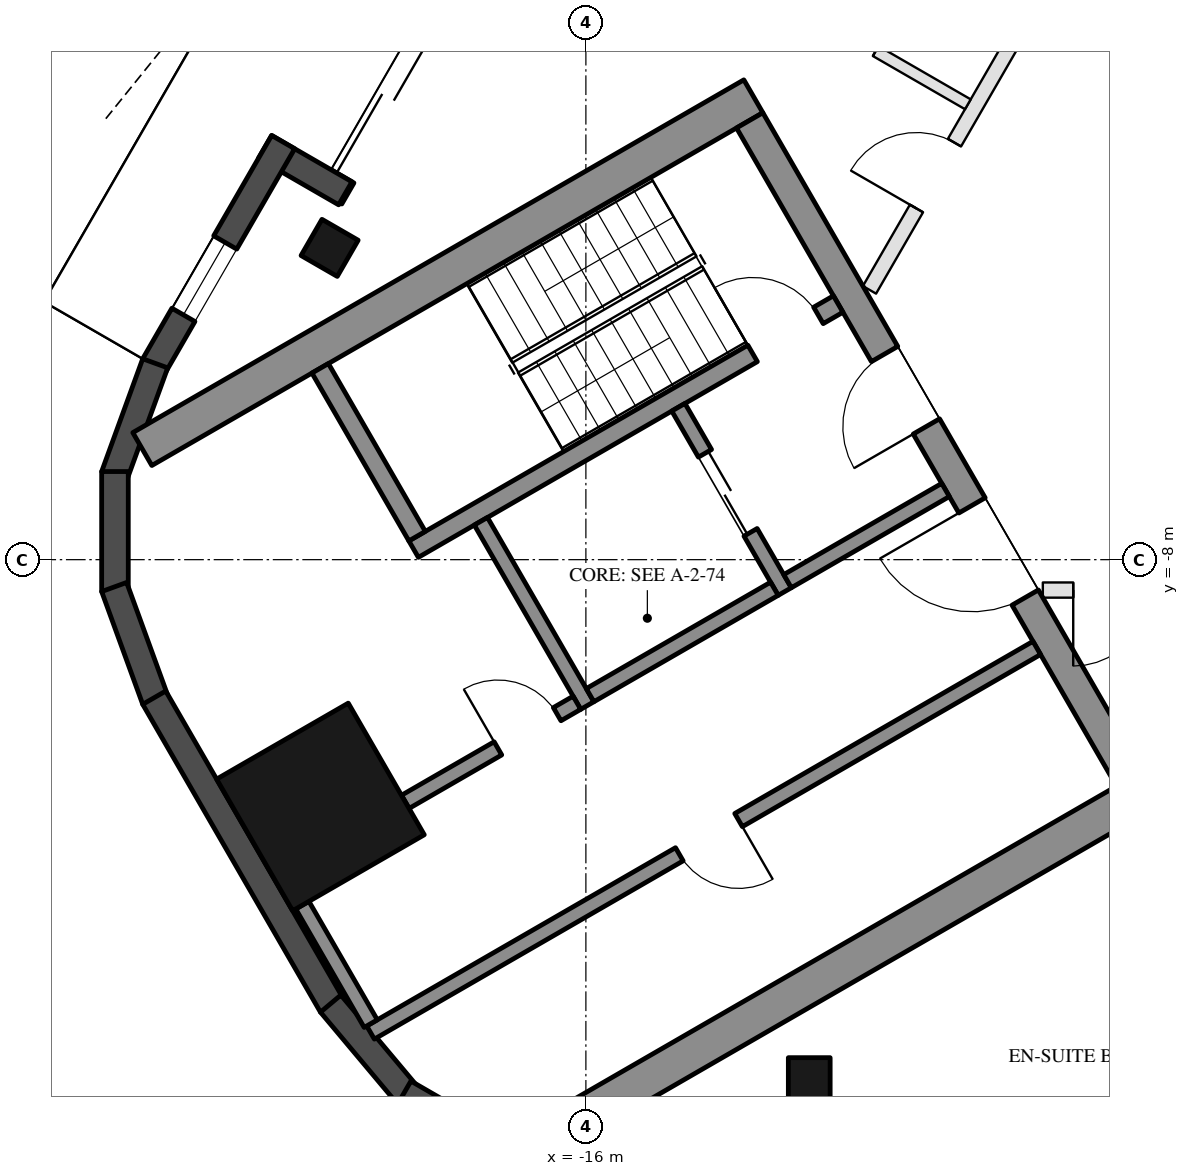
"""IFC4 building model, lengths in metres.
Left out: names, types, materials, properties, quantities, classifications, styles, units other than length and angle.
Written with IfcOpenShell. Run it as: python <this file> out.ifc"""

import sys

from ifc_helpers import new_model, si_unit, direction, frame, frame_2d, origin, origin_2d, place, context, subcontext, project, spatial, rectangle, hollow_rectangle, extrude, boolean, halfspace, element, fill, save


model = new_model("IFC4")
c1 = context("Model", 3, precision=1e-05, world=origin(), true_north=direction((0.0, 1.0)))
c2 = subcontext(c1, "Body", "Model", "MODEL_VIEW")
j1 = project(units=[si_unit("LENGTHUNIT", "METRE"), si_unit("PLANEANGLEUNIT", "RADIAN")], contexts=[c1])
p1 = place(None, origin())
s1 = spatial("IfcSite", under=j1, at=p1, CompositionType="ELEMENT")
p2 = place(p1, origin())
s2 = spatial("IfcBuilding", under=s1, at=p2, CompositionType="ELEMENT")
p3 = place(p2, frame((0.0, 0.0, 317.0)))
s3 = spatial("IfcBuildingStorey", under=s2, at=p3, CompositionType="ELEMENT", Elevation=317.0)
for number, where, z_axis, x_axis in (
    (1, (-13.061, -14.827, 0.0), (0.0, 0.0, 1.0), (-1.0, 0.0, 0.0)),
    (2, (-19.372, -3.898, 0.0), (0.0, 0.0, 1.0), (0.5, 0.866, 0.0)),
):
    element("IfcColumn", number, at=place(p3, frame(where, z_axis=z_axis, x_axis=x_axis)), inside=s3, PredefinedType="COLUMN", context=c2, shape_type="SweptSolid", body=[
        boolean("DIFFERENCE", extrude(hollow_rectangle(XDim=0.55, YDim=0.55, WallThickness=0.025, at=origin_2d()), origin(), (0.0, 0.0, 1.0), 3.7), halfspace(frame((0.0, 0.0, 3.66), z_axis=(0.0, 0.0, 1.0), x_axis=(1.0, 0.0, 0.0)), False)),
    ])
p4 = place(p3, frame((-19.492, -11.254, 0.0), z_axis=(0.0, 0.0, 1.0), x_axis=(-0.5, 0.866025403784, 0.0)))
e3 = element("IfcColumn", 3, at=p4, inside=s3, PredefinedType="COLUMN", context=c2, shape_type="SweptSolid", body=[
    boolean("DIFFERENCE", extrude(hollow_rectangle(XDim=2.0, YDim=2.0, WallThickness=0.05, at=origin_2d()), origin(), (0.0, 0.0, 1.0), 3.7), halfspace(frame((0.0, 0.0, 3.587), z_axis=(0.0, 0.0, 1.0), x_axis=(1.0, 0.0, 0.0)), False)),
])
p5 = place(p3, frame((-16.678, 1.418, 0.0), z_axis=(0.0, 0.0, 1.0), x_axis=(-0.499996591357, -0.866027371756, 0.0)))
e4 = element("IfcWall", 4, at=p5, inside=s3, PredefinedType="SOLIDWALL", context=c2, shape_type="SweptSolid", body=[
    extrude(rectangle(XDim=5.371, YDim=0.35, at=frame_2d((2.685, 0.0))), origin(), (0.0, 0.0, 1.0), 3.55),
])
p6 = place(p5, frame((2.651, 0.0, 0.0)))
e5 = element("IfcOpeningElement", 5, at=p6, cuts=e4, PredefinedType="OPENING", context=c2, shape_type="SweptSolid", body=[
    extrude(rectangle(XDim=2.4, YDim=2.4, at=frame_2d((1.2, 1.2))), frame((0.0, 0.185, 0.0), z_axis=(0.0, -1.0, 0.0), x_axis=(1.0, 0.0, 0.0)), (0.0, 0.0, 1.0), 0.37),
])
p7 = place(p5, frame((0.77, 0.0, 0.3)))
e6 = element("IfcOpeningElement", 6, at=p7, cuts=e4, PredefinedType="OPENING", context=c2, shape_type="SweptSolid", body=[
    extrude(rectangle(XDim=1.5, YDim=2.65, at=frame_2d((0.75, 1.325))), frame((0.0, 0.185, 0.0), z_axis=(0.0, -1.0, 0.0), x_axis=(1.0, 0.0, 0.0)), (0.0, 0.0, 1.0), 0.37),
])
p8 = place(p3, frame((-19.165, -3.18, 0.0), z_axis=(0.0, 0.0, 1.0), x_axis=(-0.866005645448, 0.500034220881, 0.0)))
e7 = element("IfcWall", 7, at=p8, inside=s3, PredefinedType="SOLIDWALL", context=c2, shape_type="SweptSolid", body=[
    extrude(rectangle(XDim=1.22, YDim=0.35, at=frame_2d((0.61, 0.0))), origin(), (0.0, 0.0, 1.0), 3.55),
])
p9 = place(p3, frame((-19.982, -2.506, 0.0), z_axis=(0.0, 0.0, 1.0), x_axis=(-0.500054617923, -0.865993867816, 0.0)))
e8 = element("IfcWall", 8, at=p9, inside=s3, PredefinedType="SOLIDWALL", context=c2, shape_type="SweptSolid", body=[
    extrude(rectangle(XDim=3.393, YDim=0.35, at=frame_2d((1.697, 0.0))), origin(), (0.0, 0.0, 1.0), 3.55),
])
p10 = place(p9, frame((1.525, 0.0, 0.3)))
e9 = element("IfcOpeningElement", 9, at=p10, cuts=e8, PredefinedType="OPENING", context=c2, shape_type="SweptSolid", body=[
    extrude(rectangle(XDim=1.1, YDim=2.65, at=frame_2d((0.55, 1.325))), frame((0.0, 0.185, 0.0), z_axis=(0.0, -1.0, 0.0), x_axis=(1.0, 0.0, 0.0)), (0.0, 0.0, 1.0), 0.37),
])
for number, where, z_axis, x_axis in (
    (10, (-21.666, -5.417, 0.0), (0.0, 0.0, 1.0), (-0.342, -0.94, 0.0)),
    (11, (-22.196, -6.841, 0.0), (0.0, 0.0, 1.0), (0.0, -1.0, 0.0)),
    (12, (-22.206, -8.36, 0.0), (0.0, 0.0, 1.0), (0.342, -0.94, 0.0)),
):
    element("IfcWall", number, at=place(p3, frame(where, z_axis=z_axis, x_axis=x_axis)), inside=s3, PredefinedType="SOLIDWALL", context=c2, shape_type="SweptSolid", body=[
        extrude(rectangle(XDim=1.579, YDim=0.35, at=frame_2d((0.79, 0.0))), origin(), (0.0, 0.0, 1.0), 3.55),
    ])
p11 = place(p3, frame((-21.679, -9.816, 0.0), z_axis=(0.0, 0.0, 1.0), x_axis=(0.500023656998, -0.86601174498, 0.0)))
e13 = element("IfcWall", 13, at=p11, inside=s3, PredefinedType="SOLIDWALL", context=c2, shape_type="SweptSolid", body=[
    extrude(rectangle(XDim=4.677, YDim=0.35, at=frame_2d((2.339, 0.0))), origin(), (0.0, 0.0, 1.0), 3.55),
])
for number, where, z_axis, x_axis in (
    (14, (-19.358, -13.842, 0.0), (0.0, 0.0, 1.0), (0.643, -0.766, 0.0)),
    (15, (-18.389, -15.012, 0.0), (0.0, 0.0, 1.0), (0.866, -0.5, 0.0)),
):
    element("IfcWall", number, at=place(p3, frame(where, z_axis=z_axis, x_axis=x_axis)), inside=s3, PredefinedType="SOLIDWALL", context=c2, shape_type="SweptSolid", body=[
        extrude(rectangle(XDim=1.579, YDim=0.35, at=frame_2d((0.79, 0.0))), origin(), (0.0, 0.0, 1.0), 3.55),
    ])
for number, where, z_axis, x_axis in (
    (16, (-13.797, -1.903, 0.0), (0.0, 0.0, 1.0), (-0.866, -0.5, 0.0)),
    (17, (-8.547, -10.997, 0.0), (0.0, 0.0, 1.0), (-0.866, -0.5, 0.0)),
):
    element("IfcWall", number, at=place(p3, frame(where, z_axis=z_axis, x_axis=x_axis)), inside=s3, PredefinedType="SHEAR", context=c2, shape_type="SweptSolid", body=[
        extrude(rectangle(XDim=9.283, YDim=0.5, at=frame_2d((4.641, 0.0))), origin(), (0.0, 0.0, 1.0), 3.5),
    ])
p12 = place(p3, frame((-13.845, -2.22, 0.0), z_axis=(0.0, 0.0, 1.0), x_axis=(0.500004234368, -0.866022959057, 0.0)))
e18 = element("IfcWall", 18, at=p12, inside=s3, PredefinedType="SHEAR", context=c2, shape_type="SweptSolid", body=[
    extrude(rectangle(XDim=10.0, YDim=0.4, at=frame_2d((5.0, 0.0))), origin(), (0.0, 0.0, 1.0), 3.5),
])
p13 = place(p12, frame((3.55, 0.0, 0.0)))
e19 = element("IfcOpeningElement", 19, at=p13, cuts=e18, PredefinedType="OPENING", context=c2, shape_type="SweptSolid", body=[
    extrude(rectangle(XDim=1.1, YDim=2.1, at=frame_2d((0.55, 1.05))), frame((0.0, 0.21, 0.0), z_axis=(0.0, -1.0, 0.0), x_axis=(1.0, 0.0, 0.0)), (0.0, 0.0, 1.0), 0.42),
])
p14 = place(p12, frame((5.85, 0.0, 0.0)))
e20 = element("IfcOpeningElement", 20, at=p14, cuts=e18, PredefinedType="OPENING", context=c2, shape_type="SweptSolid", body=[
    extrude(rectangle(XDim=1.4, YDim=2.1, at=frame_2d((0.7, 1.05))), frame((0.0, 0.21, 0.0), z_axis=(0.0, -1.0, 0.0), x_axis=(1.0, 0.0, 0.0)), (0.0, 0.0, 1.0), 0.42),
])
p15 = place(p3, frame((-12.681, -4.636, 0.0), z_axis=(0.0, 0.0, 1.0), x_axis=(-0.866021702275, -0.500006411147, 0.0)))
e21 = element("IfcWall", 21, at=p15, inside=s3, PredefinedType="SHEAR", context=c2, shape_type="SweptSolid", body=[
    extrude(rectangle(XDim=6.45, YDim=0.25, at=frame_2d((3.225, 0.0))), origin(), (0.0, 0.0, 1.0), 3.5),
])
p16 = place(p15, frame((0.3, 0.0, 0.0)))
e22 = element("IfcOpeningElement", 22, at=p16, cuts=e21, PredefinedType="OPENING", context=c2, shape_type="SweptSolid", body=[
    extrude(rectangle(XDim=1.0, YDim=2.1, at=frame_2d((0.5, 1.05))), frame((0.0, 0.135, 0.0), z_axis=(0.0, -1.0, 0.0), x_axis=(1.0, 0.0, 0.0)), (0.0, 0.0, 1.0), 0.27),
])
p17 = place(p3, frame((-19.496, -5.482, 0.0), z_axis=(0.0, 0.0, 1.0), x_axis=(0.499990435942, -0.866030925526, 0.0)))
e23 = element("IfcWall", 23, at=p17, inside=s3, PredefinedType="SHEAR", context=c2, shape_type="SweptSolid", body=[
    extrude(rectangle(XDim=2.55, YDim=0.25, at=frame_2d((1.275, 0.0))), origin(), (0.0, 0.0, 1.0), 3.5),
])
p18 = place(p3, frame((-17.381, -7.495, 0.0), z_axis=(0.0, 0.0, 1.0), x_axis=(0.500011755427, -0.866018616679, 0.0)))
e24 = element("IfcWall", 24, at=p18, inside=s3, PredefinedType="SHEAR", context=c2, shape_type="SweptSolid", body=[
    extrude(rectangle(XDim=2.8, YDim=0.2, at=frame_2d((1.4, 0.0))), origin(), (0.0, 0.0, 1.0), 3.5),
])
p19 = place(p3, frame((-14.783, -5.995, 0.0), z_axis=(0.0, 0.0, 1.0), x_axis=(0.49994636267, -0.866056369097, 0.0)))
e25 = element("IfcWall", 25, at=p19, inside=s3, PredefinedType="SHEAR", context=c2, shape_type="SweptSolid", body=[
    extrude(rectangle(XDim=2.8, YDim=0.2, at=frame_2d((1.4, 0.0))), origin(), (0.0, 0.0, 1.0), 3.5),
])
p20 = place(p19, frame((0.7, 0.0, 0.0)))
e26 = element("IfcOpeningElement", 26, at=p20, cuts=e25, PredefinedType="OPENING", context=c2, shape_type="SweptSolid", body=[
    extrude(rectangle(XDim=1.2, YDim=2.1, at=frame_2d((0.6, 1.05))), frame((0.0, 0.11, 0.0), z_axis=(0.0, -1.0, 0.0), x_axis=(1.0, 0.0, 0.0)), (0.0, 0.0, 1.0), 0.22),
])
p21 = place(p3, frame((-13.52, -8.383, 0.0), z_axis=(0.0, 0.0, 1.0), x_axis=(-0.866034573852, -0.49998411664, 0.0)))
e27 = element("IfcWall", 27, at=p21, inside=s3, PredefinedType="SHEAR", context=c2, shape_type="SweptSolid", body=[
    extrude(rectangle(XDim=2.8, YDim=0.2, at=frame_2d((1.4, 0.0))), origin(), (0.0, 0.0, 1.0), 3.5),
])
p22 = place(p3, frame((-11.268, -7.083, 0.0), z_axis=(0.0, 0.0, 1.0), x_axis=(-0.866050077142, -0.499957262057, 0.0)))
e28 = element("IfcWall", 28, at=p22, inside=s3, PredefinedType="SHEAR", context=c2, shape_type="SweptSolid", body=[
    extrude(rectangle(XDim=2.4, YDim=0.2, at=frame_2d((1.2, 0.0))), origin(), (0.0, 0.0, 1.0), 3.5),
])
p23 = place(p3, frame((-10.068, -9.162, 0.0), z_axis=(0.0, 0.0, 1.0), x_axis=(-0.866030125237, -0.499991822116, 0.0)))
e29 = element("IfcWall", 29, at=p23, inside=s3, PredefinedType="SHEAR", context=c2, shape_type="SweptSolid", body=[
    extrude(rectangle(XDim=10.121, YDim=0.2, at=frame_2d((5.061, 0.0))), origin(), (0.0, 0.0, 1.0), 3.5),
])
p24 = place(p23, frame((4.53, 0.0, 0.0)))
e30 = element("IfcOpeningElement", 30, at=p24, cuts=e29, PredefinedType="OPENING", context=c2, shape_type="SweptSolid", body=[
    extrude(rectangle(XDim=0.9, YDim=2.1, at=frame_2d((0.45, 1.05))), frame((0.0, 0.11, 0.0), z_axis=(0.0, -1.0, 0.0), x_axis=(1.0, 0.0, 0.0)), (0.0, 0.0, 1.0), 0.22),
])
p25 = place(p3, frame((-19.73, -12.546, 0.0), z_axis=(0.0, 0.0, 1.0), x_axis=(0.500004188491, -0.866022985545, 0.0)))
e31 = element("IfcWall", 31, at=p25, inside=s3, PredefinedType="SHEAR", context=c2, shape_type="SweptSolid", body=[
    extrude(rectangle(XDim=1.8, YDim=0.2, at=frame_2d((0.9, 0.0))), origin(), (0.0, 0.0, 1.0), 3.5),
])
p26 = place(p3, frame((-16.118, -9.883, 0.0), z_axis=(0.0, 0.0, 1.0), x_axis=(-0.866045268016, -0.499965592563, 0.0)))
e32 = element("IfcWall", 32, at=p26, inside=s3, PredefinedType="SHEAR", context=c2, shape_type="SweptSolid", body=[
    extrude(rectangle(XDim=2.608, YDim=0.2, at=frame_2d((1.304, 0.0))), origin(), (0.0, 0.0, 1.0), 3.5),
])
p27 = place(p26, frame((0.3, 0.0, 0.0)))
e33 = element("IfcOpeningElement", 33, at=p27, cuts=e32, PredefinedType="OPENING", context=c2, shape_type="SweptSolid", body=[
    extrude(rectangle(XDim=0.9, YDim=2.1, at=frame_2d((0.45, 1.05))), frame((0.0, 0.11, 0.0), z_axis=(0.0, -1.0, 0.0), x_axis=(1.0, 0.0, 0.0)), (0.0, 0.0, 1.0), 0.22),
])
p28 = place(p3, frame((-6.093, -8.4, 0.0), z_axis=(0.0, 0.0, 1.0), x_axis=(-1.0, 0.0, 0.0)))
e34 = element("IfcWall", 34, at=p28, inside=s3, PredefinedType="PARTITIONING", context=c2, shape_type="SweptSolid", body=[
    extrude(rectangle(XDim=3.895, YDim=0.2, at=frame_2d((1.948, 0.0))), origin(), (0.0, 0.0, 1.0), 3.1),
])
p29 = place(p28, frame((2.495, 0.0, 0.0)))
e35 = element("IfcOpeningElement", 35, at=p29, cuts=e34, PredefinedType="OPENING", context=c2, shape_type="SweptSolid", body=[
    extrude(rectangle(XDim=1.0, YDim=2.1, at=frame_2d((0.5, 1.05))), frame((0.0, 0.11, 0.0), z_axis=(0.0, -1.0, 0.0), x_axis=(1.0, 0.0, 0.0)), (0.0, 0.0, 1.0), 0.22),
])
p30 = place(p3, frame((-12.269, -4.45, 0.0), z_axis=(0.0, 0.0, 1.0), x_axis=(0.500006955494, 0.866021387991, 0.0)))
e36 = element("IfcWall", 36, at=p30, inside=s3, PredefinedType="PARTITIONING", context=c2, shape_type="SweptSolid", body=[
    extrude(rectangle(XDim=4.705, YDim=0.2, at=frame_2d((2.352, 0.0))), origin(), (0.0, 0.0, 1.0), 3.1),
])
p31 = place(p30, frame((1.237, 0.0, 0.0)))
e37 = element("IfcOpeningElement", 37, at=p31, cuts=e36, PredefinedType="OPENING", context=c2, shape_type="SweptSolid", body=[
    extrude(rectangle(XDim=1.0, YDim=2.1, at=frame_2d((0.5, 1.05))), frame((0.0, 0.11, 0.0), z_axis=(0.0, -1.0, 0.0), x_axis=(1.0, 0.0, 0.0)), (0.0, 0.0, 1.0), 0.22),
])
p32 = place(p3, frame((-13.399, -0.608, 0.0), z_axis=(0.0, 0.0, 1.0), x_axis=(0.866034573852, -0.49998411664, 0.0)))
e38 = element("IfcWall", 38, at=p32, inside=s3, PredefinedType="PARTITIONING", context=c2, shape_type="SweptSolid", body=[
    extrude(rectangle(XDim=2.8, YDim=0.15, at=frame_2d((1.4, 0.0))), origin(), (0.0, 0.0, 1.0), 3.55),
])
p33 = place(p32, frame((0.5, 0.0, 0.0)))
e39 = element("IfcOpeningElement", 39, at=p33, cuts=e38, PredefinedType="OPENING", context=c2, shape_type="SweptSolid", body=[
    extrude(rectangle(XDim=0.9, YDim=2.1, at=frame_2d((0.45, 1.05))), frame((0.0, 0.085, 0.0), z_axis=(0.0, -1.0, 0.0), x_axis=(1.0, 0.0, 0.0)), (0.0, 0.0, 1.0), 0.17),
])
p34 = place(p6, frame((2.4, 0.0, 0.0), z_axis=(0.0, 0.0, 1.0), x_axis=(-1.0, 0.0, 0.0)))
e40 = element("IfcDoor", 40, at=p34, inside=s3, OperationType="SLIDING_TO_LEFT", PredefinedType="DOOR", context=c2, shape_type="SweptSolid", body=[
    extrude(rectangle(XDim=2.4, YDim=2.4, at=frame_2d((1.2, 1.2))), frame((0.0, 0.025, 0.0), z_axis=(0.0, -1.0, 0.0), x_axis=(1.0, 0.0, 0.0)), (0.0, 0.0, 1.0), 0.05),
])
fill(e5, e40)
p35 = place(p10, origin())
e41 = element("IfcWindow", 41, at=p35, inside=s3, PartitioningType="SINGLE_PANEL", PredefinedType="WINDOW", context=c2, shape_type="SweptSolid", body=[
    extrude(rectangle(XDim=1.1, YDim=2.65, at=frame_2d((0.55, 1.325))), frame((0.0, 0.03, 0.0), z_axis=(0.0, -1.0, 0.0), x_axis=(1.0, 0.0, 0.0)), (0.0, 0.0, 1.0), 0.06),
])
fill(e9, e41)
p36 = place(p20, origin())
e42 = element("IfcDoor", 42, at=p36, inside=s3, OperationType="DOUBLE_DOOR_SLIDING", PredefinedType="DOOR", context=c2, shape_type="SweptSolid", body=[
    extrude(rectangle(XDim=1.2, YDim=2.1, at=frame_2d((0.6, 1.05))), frame((0.0, 0.025, 0.0), z_axis=(0.0, -1.0, 0.0), x_axis=(1.0, 0.0, 0.0)), (0.0, 0.0, 1.0), 0.05),
])
fill(e26, e42)
p37 = place(p24, origin())
e43 = element("IfcDoor", 43, at=p37, inside=s3, OperationType="SINGLE_SWING_LEFT", PredefinedType="DOOR", context=c2, shape_type="SweptSolid", body=[
    extrude(rectangle(XDim=0.9, YDim=2.1, at=frame_2d((0.45, 1.05))), frame((0.0, 0.025, 0.0), z_axis=(0.0, -1.0, 0.0), x_axis=(1.0, 0.0, 0.0)), (0.0, 0.0, 1.0), 0.05),
])
fill(e30, e43)
p38 = place(p27, frame((0.9, 0.0, 0.0), z_axis=(0.0, 0.0, 1.0), x_axis=(-1.0, 0.0, 0.0)))
e44 = element("IfcDoor", 44, at=p38, inside=s3, OperationType="SINGLE_SWING_LEFT", PredefinedType="DOOR", context=c2, shape_type="SweptSolid", body=[
    extrude(rectangle(XDim=0.9, YDim=2.1, at=frame_2d((0.45, 1.05))), frame((0.0, 0.025, 0.0), z_axis=(0.0, -1.0, 0.0), x_axis=(1.0, 0.0, 0.0)), (0.0, 0.0, 1.0), 0.05),
])
fill(e33, e44)
p39 = place(p13, frame((1.1, 0.0, 0.0), z_axis=(0.0, 0.0, 1.0), x_axis=(-1.0, 0.0, 0.0)))
e45 = element("IfcDoor", 45, at=p39, inside=s3, OperationType="SINGLE_SWING_LEFT", PredefinedType="DOOR", context=c2, shape_type="SweptSolid", body=[
    extrude(rectangle(XDim=1.1, YDim=2.1, at=frame_2d((0.55, 1.05))), frame((0.0, 0.025, 0.0), z_axis=(0.0, -1.0, 0.0), x_axis=(1.0, 0.0, 0.0)), (0.0, 0.0, 1.0), 0.05),
])
fill(e19, e45)
p40 = place(p14, frame((1.4, 0.0, 0.0), z_axis=(0.0, 0.0, 1.0), x_axis=(-1.0, 0.0, 0.0)))
e46 = element("IfcDoor", 46, at=p40, inside=s3, OperationType="DOUBLE_DOOR_SINGLE_SWING", PredefinedType="DOOR", context=c2, shape_type="SweptSolid", body=[
    extrude(rectangle(XDim=1.4, YDim=2.1, at=frame_2d((0.7, 1.05))), frame((0.0, 0.025, 0.0), z_axis=(0.0, -1.0, 0.0), x_axis=(1.0, 0.0, 0.0)), (0.0, 0.0, 1.0), 0.05),
])
fill(e20, e46)
p41 = place(p16, frame((1.0, 0.0, 0.0), z_axis=(0.0, 0.0, 1.0), x_axis=(-1.0, 0.0, 0.0)))
e47 = element("IfcDoor", 47, at=p41, inside=s3, OperationType="SINGLE_SWING_LEFT", PredefinedType="DOOR", context=c2, shape_type="SweptSolid", body=[
    extrude(rectangle(XDim=1.0, YDim=2.1, at=frame_2d((0.5, 1.05))), frame((0.0, 0.025, 0.0), z_axis=(0.0, -1.0, 0.0), x_axis=(1.0, 0.0, 0.0)), (0.0, 0.0, 1.0), 0.05),
])
fill(e22, e47)
p42 = place(p29, origin())
e48 = element("IfcDoor", 48, at=p42, inside=s3, OperationType="SINGLE_SWING_RIGHT", PredefinedType="DOOR", context=c2, shape_type="SweptSolid", body=[
    extrude(rectangle(XDim=1.0, YDim=2.1, at=frame_2d((0.5, 1.05))), frame((0.0, 0.025, 0.0), z_axis=(0.0, -1.0, 0.0), x_axis=(1.0, 0.0, 0.0)), (0.0, 0.0, 1.0), 0.05),
])
fill(e35, e48)
p43 = place(p33, origin())
e49 = element("IfcDoor", 49, at=p43, inside=s3, OperationType="SINGLE_SWING_LEFT", PredefinedType="DOOR", context=c2, shape_type="SweptSolid", body=[
    extrude(rectangle(XDim=0.9, YDim=2.1, at=frame_2d((0.45, 1.05))), frame((0.0, 0.025, 0.0), z_axis=(0.0, -1.0, 0.0), x_axis=(1.0, 0.0, 0.0)), (0.0, 0.0, 1.0), 0.05),
])
fill(e39, e49)
p44 = place(p31, origin())
e50 = element("IfcDoor", 50, at=p44, inside=s3, OperationType="SINGLE_SWING_LEFT", PredefinedType="DOOR", context=c2, shape_type="SweptSolid", body=[
    extrude(rectangle(XDim=1.0, YDim=2.1, at=frame_2d((0.5, 1.05))), frame((0.0, 0.025, 0.0), z_axis=(0.0, -1.0, 0.0), x_axis=(1.0, 0.0, 0.0)), (0.0, 0.0, 1.0), 0.05),
])
fill(e37, e50)
save(model, sys.argv[1])
